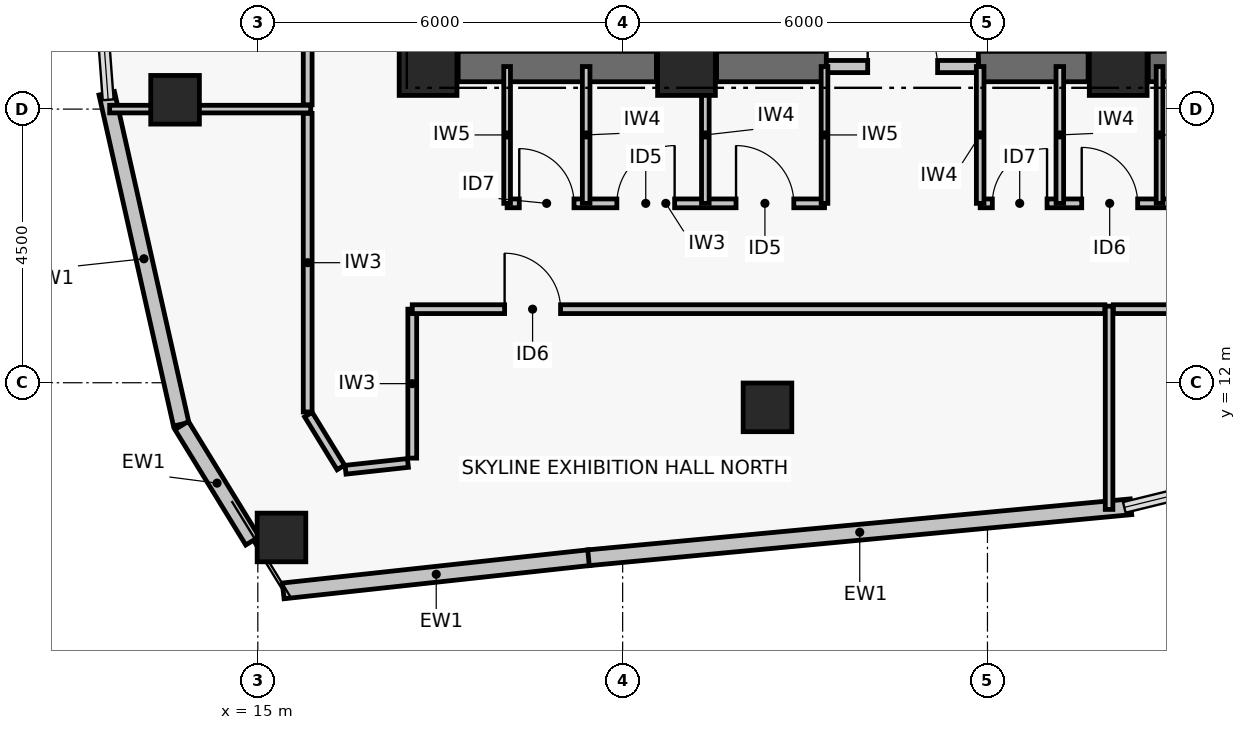
"""IFC4 building model, lengths in metres.
Left out: names, types, materials, properties, quantities, classifications, styles, units other than length and angle.
Written with IfcOpenShell. Run it as: python <this file> out.ifc"""

import sys

from ifc_helpers import new_model, si_unit, direction, frame, frame_2d, origin, origin_2d, place, context, subcontext, project, spatial, rectangle, hollow_rectangle, extrude, element, fill, save


model = new_model("IFC4")
c1 = context("Model", 3, precision=1e-05, world=origin(), true_north=direction((0.0, 1.0)))
c2 = subcontext(c1, "Body", "Model", "MODEL_VIEW")
j1 = project(units=[si_unit("LENGTHUNIT", "METRE"), si_unit("PLANEANGLEUNIT", "RADIAN")], contexts=[c1])
p1 = place(None, origin())
s1 = spatial("IfcSite", under=j1, at=p1, CompositionType="ELEMENT")
p2 = place(p1, origin())
s2 = spatial("IfcBuilding", under=s1, at=p2, CompositionType="ELEMENT")
p3 = place(p2, frame((0.0, 0.0, 238.14)))
s3 = spatial("IfcBuildingStorey", under=s2, at=p3, CompositionType="ELEMENT", Elevation=238.14)
for number, where, z_axis, x_axis in (
    (1, (17.8, 17.2, 0.0), (0.0, 0.0, 1.0), (1.0, 0.0, 0.0)),
    (2, (22.05, 17.2, 0.0), (0.0, 0.0, 1.0), (1.0, 0.0, 0.0)),
    (3, (29.15, 17.2, 0.0), (0.0, 0.0, 1.0), (1.0, 0.0, 0.0)),
):
    element("IfcColumn", number, at=place(p3, frame(where, z_axis=z_axis, x_axis=x_axis)), inside=s3, PredefinedType="COLUMN", context=c2, shape_type="SweptSolid", body=[
        extrude(rectangle(XDim=0.95, YDim=0.95, at=origin_2d()), origin(), (0.0, 0.0, 1.0), 4.5),
    ])
p4 = place(p3, frame((18.295, 17.2, 0.0), z_axis=(0.0, 0.0, 1.0), x_axis=(1.0, 0.0, 0.0)))
e4 = element("IfcWall", 4, at=p4, inside=s3, PredefinedType="SHEAR", context=c2, shape_type="SweptSolid", body=[
    extrude(rectangle(XDim=3.26, YDim=0.5, at=frame_2d((1.63, 0.0))), origin(), (0.0, 0.0, 1.0), 4.22),
])
p5 = place(p3, frame((22.545, 17.2, 0.0), z_axis=(0.0, 0.0, 1.0), x_axis=(1.0, 0.0, 0.0)))
e5 = element("IfcWall", 5, at=p5, inside=s3, PredefinedType="SHEAR", context=c2, shape_type="SweptSolid", body=[
    extrude(rectangle(XDim=1.805, YDim=0.5, at=frame_2d((0.903, 0.0))), origin(), (0.0, 0.0, 1.0), 4.22),
])
p6 = place(p3, frame((26.85, 17.2, 0.0), z_axis=(0.0, 0.0, 1.0), x_axis=(1.0, 0.0, 0.0)))
e6 = element("IfcWall", 6, at=p6, inside=s3, PredefinedType="SHEAR", context=c2, shape_type="SweptSolid", body=[
    extrude(rectangle(XDim=1.805, YDim=0.5, at=frame_2d((0.902, 0.0))), origin(), (0.0, 0.0, 1.0), 4.22),
])
p7 = place(p3, frame((29.645, 17.2, 0.0), z_axis=(0.0, 0.0, 1.0), x_axis=(1.0, 0.0, 0.0)))
e7 = element("IfcWall", 7, at=p7, inside=s3, PredefinedType="SHEAR", context=c2, shape_type="SweptSolid", body=[
    extrude(rectangle(XDim=3.26, YDim=0.5, at=frame_2d((1.63, 0.0))), origin(), (0.0, 0.0, 1.0), 4.22),
])
for number, where, z_axis, x_axis in (
    (8, (13.639, 16.653, 0.0), (0.0, 0.0, 1.0), (1.0, 0.0, 0.0)),
    (9, (15.389, 9.455, 0.0), (0.0, 0.0, 1.0), (1.0, 0.0, 0.0)),
    (10, (23.382, 11.595, 0.0), (0.0, 0.0, 1.0), (1.0, 0.0, 0.0)),
):
    element("IfcColumn", number, at=place(p3, frame(where, z_axis=z_axis, x_axis=x_axis)), inside=s3, PredefinedType="COLUMN", context=c2, shape_type="SweptSolid", body=[
        extrude(hollow_rectangle(XDim=0.8, YDim=0.8, WallThickness=0.035, at=origin_2d()), origin(), (0.0, 0.0, 1.0), 4.5),
    ])
p8 = place(p3, frame((13.74, 11.317, 0.0), z_axis=(0.0, 0.0, 1.0), x_axis=(-0.219510112872, 0.975610224601, 0.0)))
e11 = element("IfcWall", 11, at=p8, inside=s3, PredefinedType="PARTITIONING", context=c2, shape_type="SweptSolid", body=[
    extrude(rectangle(XDim=5.58, YDim=0.26, at=frame_2d((2.79, 0.0))), origin(), (0.0, 0.0, 1.0), 4.22),
])
p9 = place(p3, frame((14.912, 9.4, 0.0), z_axis=(0.0, 0.0, 1.0), x_axis=(-0.52314291314, 0.852244972077, 0.0)))
e12 = element("IfcWall", 12, at=p9, inside=s3, PredefinedType="PARTITIONING", context=c2, shape_type="SweptSolid", body=[
    extrude(rectangle(XDim=2.227, YDim=0.26, at=frame_2d((1.114, 0.0))), origin(), (0.0, 0.0, 1.0), 4.22),
])
p10 = place(p3, frame((20.45, 9.123, 0.0), z_axis=(0.0, 0.0, 1.0), x_axis=(-0.994158757437, -0.107927591518, 0.0)))
e13 = element("IfcWall", 13, at=p10, inside=s3, PredefinedType="PARTITIONING", context=c2, shape_type="SweptSolid", body=[
    extrude(rectangle(XDim=5.062, YDim=0.26, at=frame_2d((2.531, 0.0))), origin(), (0.0, 0.0, 1.0), 4.22),
])
p11 = place(p3, frame((29.36, 9.96, 0.0), z_axis=(0.0, 0.0, 1.0), x_axis=(-0.995616246459, -0.093532292754, 0.0)))
e14 = element("IfcWall", 14, at=p11, inside=s3, PredefinedType="PARTITIONING", context=c2, shape_type="SweptSolid", body=[
    extrude(rectangle(XDim=8.961, YDim=0.26, at=frame_2d((4.48, 0.0))), origin(), (0.0, 0.0, 1.0), 4.22),
])
p12 = place(p3, frame((24.35, 17.2, 0.0), z_axis=(0.0, 0.0, 1.0), x_axis=(1.0, 0.0, 0.0)))
e15 = element("IfcWall", 15, at=p12, inside=s3, PredefinedType="PARTITIONING", context=c2, shape_type="SweptSolid", body=[
    extrude(rectangle(XDim=2.5, YDim=0.2, at=frame_2d((1.25, 0.0))), origin(), (0.0, 0.0, 1.0), 3.35),
])
p13 = place(p12, frame((0.68, 0.0, 0.0)))
e16 = element("IfcOpeningElement", 16, at=p13, cuts=e15, PredefinedType="OPENING", context=c2, shape_type="SweptSolid", body=[
    extrude(rectangle(XDim=1.15, YDim=2.08, at=frame_2d((0.575, 1.04))), frame((0.0, 0.11, 0.0), z_axis=(0.0, -1.0, 0.0), x_axis=(1.0, 0.0, 0.0)), (0.0, 0.0, 1.0), 0.22),
])
p14 = place(p3, frame((19.1, 14.95, 0.0), z_axis=(0.0, 0.0, 1.0), x_axis=(1.0, 0.0, 0.0)))
e17 = element("IfcWall", 17, at=p14, inside=s3, PredefinedType="PARTITIONING", context=c2, shape_type="SweptSolid", body=[
    extrude(rectangle(XDim=5.22, YDim=0.145, at=frame_2d((2.61, 0.0))), origin(), (0.0, 0.0, 1.0), 3.5),
])
p15 = place(p14, frame((0.2, 0.0, 0.0)))
e18 = element("IfcOpeningElement", 18, at=p15, cuts=e17, PredefinedType="OPENING", context=c2, shape_type="SweptSolid", body=[
    extrude(rectangle(XDim=0.9, YDim=2.02, at=frame_2d((0.45, 1.01))), frame((0.0, 0.083, 0.0), z_axis=(0.0, -1.0, 0.0), x_axis=(1.0, 0.0, 0.0)), (0.0, 0.0, 1.0), 0.165),
])
p16 = place(p14, frame((1.805, 0.0, 0.0)))
e19 = element("IfcOpeningElement", 19, at=p16, cuts=e17, PredefinedType="OPENING", context=c2, shape_type="SweptSolid", body=[
    extrude(rectangle(XDim=0.95, YDim=2.06, at=frame_2d((0.475, 1.03))), frame((0.0, 0.083, 0.0), z_axis=(0.0, -1.0, 0.0), x_axis=(1.0, 0.0, 0.0)), (0.0, 0.0, 1.0), 0.165),
])
p17 = place(p14, frame((3.765, 0.0, 0.0)))
e20 = element("IfcOpeningElement", 20, at=p17, cuts=e17, PredefinedType="OPENING", context=c2, shape_type="SweptSolid", body=[
    extrude(rectangle(XDim=0.95, YDim=2.06, at=frame_2d((0.475, 1.03))), frame((0.0, 0.083, 0.0), z_axis=(0.0, -1.0, 0.0), x_axis=(1.0, 0.0, 0.0)), (0.0, 0.0, 1.0), 0.165),
])
p18 = place(p3, frame((26.88, 14.95, 0.0), z_axis=(0.0, 0.0, 1.0), x_axis=(1.0, 0.0, 0.0)))
e21 = element("IfcWall", 21, at=p18, inside=s3, PredefinedType="PARTITIONING", context=c2, shape_type="SweptSolid", body=[
    extrude(rectangle(XDim=4.22, YDim=0.145, at=frame_2d((2.11, 0.0))), origin(), (0.0, 0.0, 1.0), 3.7),
])
p19 = place(p18, frame((0.2, 0.0, 0.0)))
e22 = element("IfcOpeningElement", 22, at=p19, cuts=e21, PredefinedType="OPENING", context=c2, shape_type="SweptSolid", body=[
    extrude(rectangle(XDim=0.9, YDim=2.02, at=frame_2d((0.45, 1.01))), frame((0.0, 0.083, 0.0), z_axis=(0.0, -1.0, 0.0), x_axis=(1.0, 0.0, 0.0)), (0.0, 0.0, 1.0), 0.165),
])
p20 = place(p18, frame((1.67, 0.0, 0.0)))
e23 = element("IfcOpeningElement", 23, at=p20, cuts=e21, PredefinedType="OPENING", context=c2, shape_type="SweptSolid", body=[
    extrude(rectangle(XDim=0.92, YDim=2.05, at=frame_2d((0.46, 1.025))), frame((0.0, 0.083, 0.0), z_axis=(0.0, -1.0, 0.0), x_axis=(1.0, 0.0, 0.0)), (0.0, 0.0, 1.0), 0.165),
])
p21 = place(p18, frame((3.14, 0.0, 0.0)))
e24 = element("IfcOpeningElement", 24, at=p21, cuts=e21, PredefinedType="OPENING", context=c2, shape_type="SweptSolid", body=[
    extrude(rectangle(XDim=0.9, YDim=2.02, at=frame_2d((0.45, 1.01))), frame((0.0, 0.083, 0.0), z_axis=(0.0, -1.0, 0.0), x_axis=(1.0, 0.0, 0.0)), (0.0, 0.0, 1.0), 0.165),
])
p22 = place(p3, frame((19.1, 14.95, 0.0), z_axis=(0.0, 0.0, 1.0), x_axis=(0.0, 1.0, 0.0)))
e25 = element("IfcWall", 25, at=p22, inside=s3, PredefinedType="PARTITIONING", context=c2, shape_type="SweptSolid", body=[
    extrude(rectangle(XDim=2.25, YDim=0.11, at=frame_2d((1.125, 0.0))), origin(), (0.0, 0.0, 1.0), 3.35),
])
for number, where, z_axis, x_axis in (
    (26, (20.4, 14.95, 0.0), (0.0, 0.0, 1.0), (0.0, 1.0, 0.0)),
    (27, (22.36, 14.95, 0.0), (0.0, 0.0, 1.0), (0.0, 1.0, 0.0)),
):
    element("IfcWall", number, at=place(p3, frame(where, z_axis=z_axis, x_axis=x_axis)), inside=s3, PredefinedType="PARTITIONING", context=c2, shape_type="SweptSolid", body=[
        extrude(rectangle(XDim=2.25, YDim=0.125, at=frame_2d((1.125, 0.0))), origin(), (0.0, 0.0, 1.0), 3.35),
    ])
p23 = place(p3, frame((24.32, 14.95, 0.0), z_axis=(0.0, 0.0, 1.0), x_axis=(0.0, 1.0, 0.0)))
e28 = element("IfcWall", 28, at=p23, inside=s3, PredefinedType="PARTITIONING", context=c2, shape_type="SweptSolid", body=[
    extrude(rectangle(XDim=2.25, YDim=0.11, at=frame_2d((1.125, 0.0))), origin(), (0.0, 0.0, 1.0), 3.35),
])
for number, where, z_axis, x_axis in (
    (29, (26.88, 14.95, 0.0), (0.0, 0.0, 1.0), (0.0, 1.0, 0.0)),
    (30, (28.19, 14.95, 0.0), (0.0, 0.0, 1.0), (0.0, 1.0, 0.0)),
):
    element("IfcWall", number, at=place(p3, frame(where, z_axis=z_axis, x_axis=x_axis)), inside=s3, PredefinedType="PARTITIONING", context=c2, shape_type="SweptSolid", body=[
        extrude(rectangle(XDim=2.25, YDim=0.125, at=frame_2d((1.125, 0.0))), origin(), (0.0, 0.0, 1.0), 3.35),
    ])
p24 = place(p3, frame((29.83, 14.95, 0.0), z_axis=(0.0, 0.0, 1.0), x_axis=(0.0, 1.0, 0.0)))
e31 = element("IfcWall", 31, at=p24, inside=s3, PredefinedType="PARTITIONING", context=c2, shape_type="SweptSolid", body=[
    extrude(rectangle(XDim=2.25, YDim=0.11, at=frame_2d((1.125, 0.0))), origin(), (0.0, 0.0, 1.0), 3.35),
])
p25 = place(p3, frame((15.82, 16.43, 0.0), z_axis=(0.0, 0.0, 1.0), x_axis=(0.0, -1.0, 0.0)))
e32 = element("IfcWall", 32, at=p25, inside=s3, PredefinedType="PARTITIONING", context=c2, shape_type="SweptSolid", body=[
    extrude(rectangle(XDim=4.911, YDim=0.145, at=frame_2d((2.456, 0.0))), origin(), (0.0, 0.0, 1.0), 3.5),
])
p26 = place(p3, frame((15.832, 11.477, 0.0), z_axis=(0.0, 0.0, 1.0), x_axis=(0.523122844464, -0.852257290729, 0.0)))
e33 = element("IfcWall", 33, at=p26, inside=s3, PredefinedType="PARTITIONING", context=c2, shape_type="SweptSolid", body=[
    extrude(rectangle(XDim=1.021, YDim=0.145, at=frame_2d((0.51, 0.0))), origin(), (0.0, 0.0, 1.0), 3.5),
])
p27 = place(p3, frame((16.442, 10.569, 0.0), z_axis=(0.0, 0.0, 1.0), x_axis=(0.994140595739, 0.108094754283, 0.0)))
e34 = element("IfcWall", 34, at=p27, inside=s3, PredefinedType="PARTITIONING", context=c2, shape_type="SweptSolid", body=[
    extrude(rectangle(XDim=1.032, YDim=0.145, at=frame_2d((0.516, 0.0))), origin(), (0.0, 0.0, 1.0), 4.22),
])
p28 = place(p3, frame((17.54, 10.76, 0.0), z_axis=(0.0, 0.0, 1.0), x_axis=(0.0, 1.0, 0.0)))
e35 = element("IfcWall", 35, at=p28, inside=s3, PredefinedType="PARTITIONING", context=c2, shape_type="SweptSolid", body=[
    extrude(rectangle(XDim=2.45, YDim=0.145, at=frame_2d((1.225, 0.0))), origin(), (0.0, 0.0, 1.0), 3.85),
])
p29 = place(p3, frame((17.54, 13.21, 0.0), z_axis=(0.0, 0.0, 1.0), x_axis=(1.0, 0.0, 0.0)))
e36 = element("IfcWall", 36, at=p29, inside=s3, PredefinedType="PARTITIONING", context=c2, shape_type="SweptSolid", body=[
    extrude(rectangle(XDim=11.39, YDim=0.145, at=frame_2d((5.695, 0.0))), origin(), (0.0, 0.0, 1.0), 3.5),
])
p30 = place(p29, frame((1.519, 0.0, 0.0)))
e37 = element("IfcOpeningElement", 37, at=p30, cuts=e36, PredefinedType="OPENING", context=c2, shape_type="SweptSolid", body=[
    extrude(rectangle(XDim=0.92, YDim=2.05, at=frame_2d((0.46, 1.025))), frame((0.0, 0.083, 0.0), z_axis=(0.0, -1.0, 0.0), x_axis=(1.0, 0.0, 0.0)), (0.0, 0.0, 1.0), 0.165),
])
p31 = place(p3, frame((29.07, 13.21, 0.0), z_axis=(0.0, 0.0, 1.0), x_axis=(1.0, 0.0, 0.0)))
e38 = element("IfcWall", 38, at=p31, inside=s3, PredefinedType="PARTITIONING", context=c2, shape_type="SweptSolid", body=[
    extrude(rectangle(XDim=2.23, YDim=0.145, at=frame_2d((1.115, 0.0))), origin(), (0.0, 0.0, 1.0), 4.22),
])
p32 = place(p3, frame((15.82, 27.43, 0.0), z_axis=(0.0, 0.0, 1.0), x_axis=(0.0, -1.0, 0.0)))
e39 = element("IfcWall", 39, at=p32, inside=s3, PredefinedType="PARTITIONING", context=c2, shape_type="SweptSolid", body=[
    extrude(rectangle(XDim=10.86, YDim=0.145, at=frame_2d((5.43, 0.0))), origin(), (0.0, 0.0, 1.0), 3.5),
])
p33 = place(p32, frame((4.955, 0.0, 0.0)))
e40 = element("IfcOpeningElement", 40, at=p33, cuts=e39, PredefinedType="OPENING", context=c2, shape_type="SweptSolid", body=[
    extrude(rectangle(XDim=0.95, YDim=2.06, at=frame_2d((0.475, 1.03))), frame((0.0, 0.083, 0.0), z_axis=(0.0, -1.0, 0.0), x_axis=(1.0, 0.0, 0.0)), (0.0, 0.0, 1.0), 0.165),
])
p34 = place(p3, frame((29.0, 9.917, 0.0), z_axis=(0.0, 0.0, 1.0), x_axis=(0.0, 1.0, 0.0)))
e41 = element("IfcWall", 41, at=p34, inside=s3, PredefinedType="PARTITIONING", context=c2, shape_type="SweptSolid", body=[
    extrude(rectangle(XDim=3.344, YDim=0.125, at=frame_2d((1.672, 0.0))), origin(), (0.0, 0.0, 1.0), 4.22),
])
p35 = place(p3, frame((12.563, 16.5, 0.0), z_axis=(0.0, 0.0, 1.0), x_axis=(1.0, 0.0, 0.0)))
e42 = element("IfcWall", 42, at=p35, inside=s3, PredefinedType="PARTITIONING", context=c2, shape_type="SweptSolid", body=[
    extrude(rectangle(XDim=3.307, YDim=0.125, at=frame_2d((1.653, 0.0))), origin(), (0.0, 0.0, 1.0), 3.5),
])
p36 = place(p13, origin())
e43 = element("IfcDoor", 43, at=p36, inside=s3, OperationType="SINGLE_SWING_LEFT", PredefinedType="DOOR", context=c2, shape_type="SweptSolid", body=[
    extrude(rectangle(XDim=1.15, YDim=2.08, at=frame_2d((0.575, 1.04))), frame((0.0, 0.025, 0.0), z_axis=(0.0, -1.0, 0.0), x_axis=(1.0, 0.0, 0.0)), (0.0, 0.0, 1.0), 0.05),
])
fill(e16, e43)
p37 = place(p15, origin())
e44 = element("IfcDoor", 44, at=p37, inside=s3, OperationType="SINGLE_SWING_LEFT", PredefinedType="DOOR", context=c2, shape_type="SweptSolid", body=[
    extrude(rectangle(XDim=0.9, YDim=2.02, at=frame_2d((0.45, 1.01))), frame((0.0, 0.025, 0.0), z_axis=(0.0, -1.0, 0.0), x_axis=(1.0, 0.0, 0.0)), (0.0, 0.0, 1.0), 0.05),
])
fill(e18, e44)
p38 = place(p16, origin())
e45 = element("IfcDoor", 45, at=p38, inside=s3, OperationType="SINGLE_SWING_RIGHT", PredefinedType="DOOR", context=c2, shape_type="SweptSolid", body=[
    extrude(rectangle(XDim=0.95, YDim=2.06, at=frame_2d((0.475, 1.03))), frame((0.0, 0.025, 0.0), z_axis=(0.0, -1.0, 0.0), x_axis=(1.0, 0.0, 0.0)), (0.0, 0.0, 1.0), 0.05),
])
fill(e19, e45)
p39 = place(p17, origin())
e46 = element("IfcDoor", 46, at=p39, inside=s3, OperationType="SINGLE_SWING_LEFT", PredefinedType="DOOR", context=c2, shape_type="SweptSolid", body=[
    extrude(rectangle(XDim=0.95, YDim=2.06, at=frame_2d((0.475, 1.03))), frame((0.0, 0.025, 0.0), z_axis=(0.0, -1.0, 0.0), x_axis=(1.0, 0.0, 0.0)), (0.0, 0.0, 1.0), 0.05),
])
fill(e20, e46)
p40 = place(p19, origin())
e47 = element("IfcDoor", 47, at=p40, inside=s3, OperationType="SINGLE_SWING_RIGHT", PredefinedType="DOOR", context=c2, shape_type="SweptSolid", body=[
    extrude(rectangle(XDim=0.9, YDim=2.02, at=frame_2d((0.45, 1.01))), frame((0.0, 0.025, 0.0), z_axis=(0.0, -1.0, 0.0), x_axis=(1.0, 0.0, 0.0)), (0.0, 0.0, 1.0), 0.05),
])
fill(e22, e47)
p41 = place(p20, origin())
e48 = element("IfcDoor", 48, at=p41, inside=s3, OperationType="SINGLE_SWING_LEFT", PredefinedType="DOOR", context=c2, shape_type="SweptSolid", body=[
    extrude(rectangle(XDim=0.92, YDim=2.05, at=frame_2d((0.46, 1.025))), frame((0.0, 0.025, 0.0), z_axis=(0.0, -1.0, 0.0), x_axis=(1.0, 0.0, 0.0)), (0.0, 0.0, 1.0), 0.05),
])
fill(e23, e48)
p42 = place(p30, origin())
e49 = element("IfcDoor", 49, at=p42, inside=s3, OperationType="SINGLE_SWING_LEFT", PredefinedType="DOOR", context=c2, shape_type="SweptSolid", body=[
    extrude(rectangle(XDim=0.92, YDim=2.05, at=frame_2d((0.46, 1.025))), frame((0.0, 0.025, 0.0), z_axis=(0.0, -1.0, 0.0), x_axis=(1.0, 0.0, 0.0)), (0.0, 0.0, 1.0), 0.05),
])
fill(e37, e49)
save(model, sys.argv[1])
